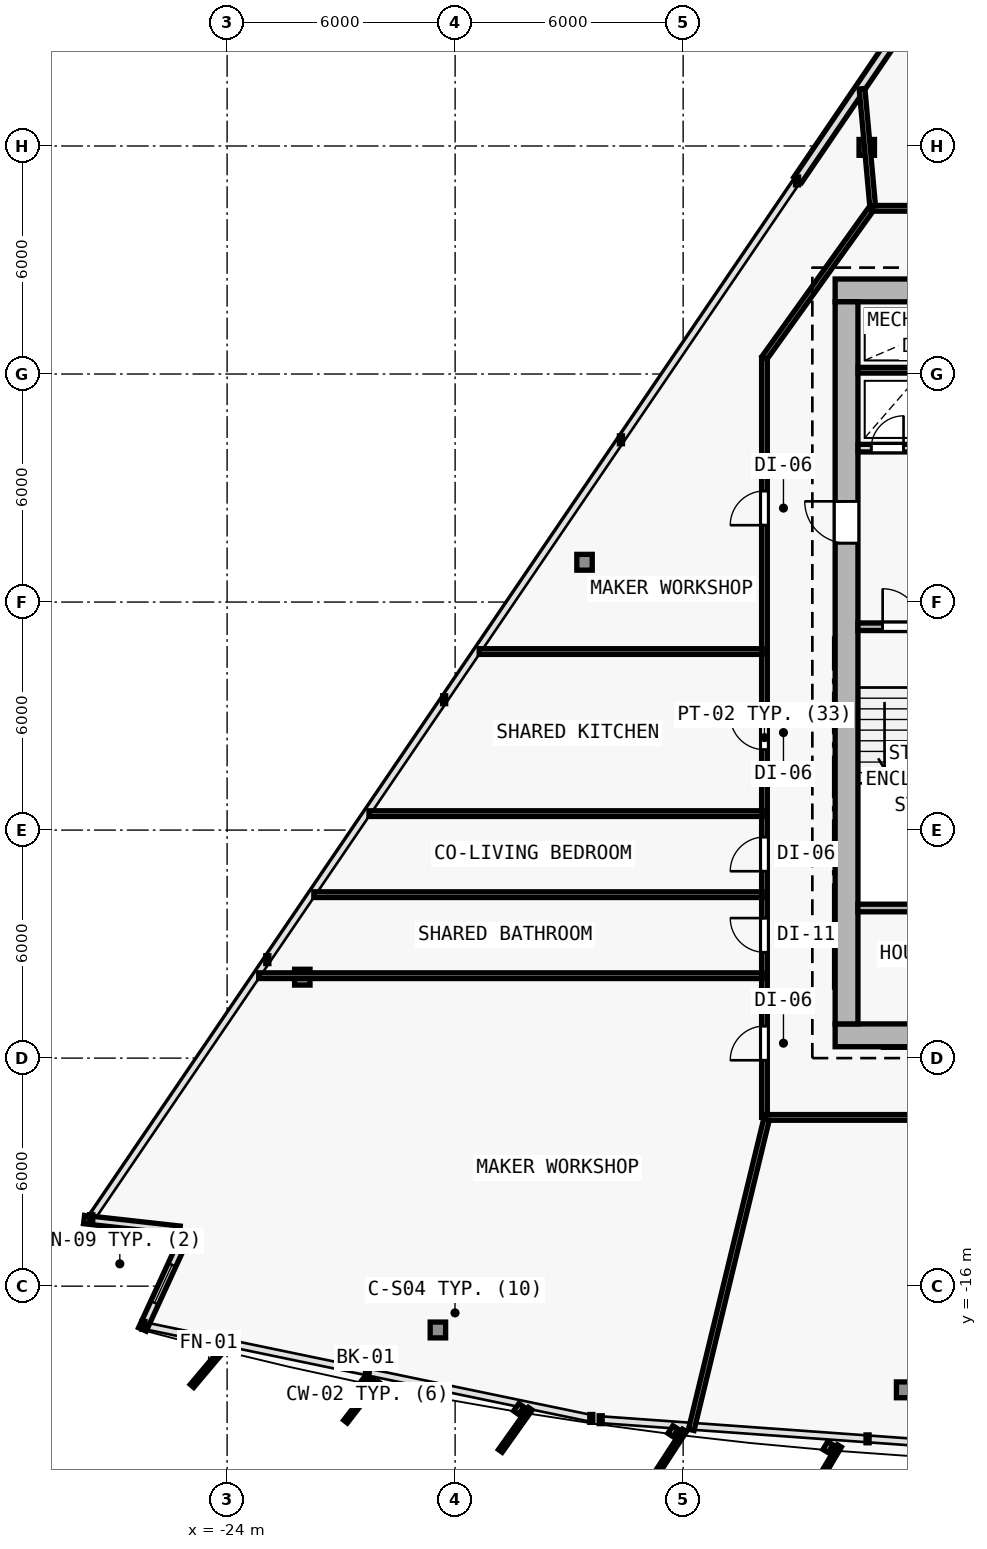
"""IFC4 building model, lengths in metres.
Left out: names, types, materials, properties, quantities, classifications, styles, units other than length and angle.
Written with IfcOpenShell. Run it as: python <this file> out.ifc"""

import sys

from ifc_helpers import new_model, si_unit, direction, frame, frame_2d, origin, origin_2d, place, context, subcontext, project, spatial, rectangle, i_section, extrude, element, fill, save


model = new_model("IFC4")
c1 = context("Model", 3, precision=1e-05, world=origin(), true_north=direction((0.0, 1.0)))
c2 = subcontext(c1, "Body", "Model", "MODEL_VIEW")
j1 = project(units=[si_unit("LENGTHUNIT", "METRE"), si_unit("PLANEANGLEUNIT", "RADIAN")], contexts=[c1])
p1 = place(None, origin())
s1 = spatial("IfcSite", under=j1, at=p1, CompositionType="ELEMENT")
p2 = place(p1, origin())
s2 = spatial("IfcBuilding", under=s1, at=p2, CompositionType="ELEMENT")
p3 = place(p2, frame((0.0, 0.0, 122.1)))
s3 = spatial("IfcBuildingStorey", under=s2, at=p3, CompositionType="ELEMENT", Elevation=122.1)
for number, where, z_axis, x_axis in (
    (1, (-7.7, -9.4, 0.0), (0.0, 0.0, 1.0), (1.0, 0.0, 0.0)),
    (2, (-7.7, 10.2, 0.0), (0.0, 0.0, 1.0), (1.0, 0.0, 0.0)),
    (3, (-7.7, 2.0, 0.0), (0.0, 0.0, 1.0), (1.0, 0.0, 0.0)),
):
    element("IfcColumn", number, at=place(p3, frame(where, z_axis=z_axis, x_axis=x_axis)), inside=s3, PredefinedType="COLUMN", context=c2, shape_type="SweptSolid", body=[
        extrude(i_section(OverallWidth=0.409, OverallDepth=0.425, WebThickness=0.021, FlangeThickness=0.034, FilletRadius=0.015, at=origin_2d()), origin(), (0.0, 0.0, 1.0), 3.6),
    ])
p4 = place(p3, frame((-18.453, -17.153, 0.005), z_axis=(0.020594893987, 0.033509183946, 0.999226193078), x_axis=(-0.851954850327, 0.523615252838, 0.0)))
e4 = element("IfcColumn", 4, at=p4, inside=s3, PredefinedType="COLUMN", context=c2, shape_type="SweptSolid", body=[
    extrude(i_section(OverallWidth=0.406, OverallDepth=0.416, WebThickness=0.019, FlangeThickness=0.031, FilletRadius=0.015, at=origin_2d()), origin(), (0.0, 0.0, 1.0), 3.592),
])
p5 = place(p3, frame((-6.185, -18.729, 0.005), z_axis=(0.006865841702, 0.035280909339, 0.999353850072), x_axis=(-0.981585848295, 0.191021523464, 0.0)))
e5 = element("IfcColumn", 5, at=p5, inside=s3, PredefinedType="COLUMN", context=c2, shape_type="SweptSolid", body=[
    extrude(i_section(OverallWidth=0.406, OverallDepth=0.416, WebThickness=0.019, FlangeThickness=0.031, FilletRadius=0.015, at=origin_2d()), origin(), (0.0, 0.0, 1.0), 3.592),
])
p6 = place(p3, frame((-7.168, 13.963, 0.005), z_axis=(0.008774547672, -0.002516730728, 0.999958335822), x_axis=(0.275705143097, 0.961242255662, 0.0)))
e6 = element("IfcColumn", 6, at=p6, inside=s3, PredefinedType="COLUMN", context=c2, shape_type="SweptSolid", body=[
    extrude(i_section(OverallWidth=0.406, OverallDepth=0.416, WebThickness=0.019, FlangeThickness=0.031, FilletRadius=0.015, at=origin_2d()), origin(), (0.0, 0.0, 1.0), 3.589),
])
p7 = place(p3, frame((-14.595, 3.047, 0.005), z_axis=(0.017070406608, 0.009521342331, 0.99980895438), x_axis=(-0.487119351792, 0.873335409284, 0.0)))
e7 = element("IfcColumn", 7, at=p7, inside=s3, PredefinedType="COLUMN", context=c2, shape_type="SweptSolid", body=[
    extrude(i_section(OverallWidth=0.406, OverallDepth=0.416, WebThickness=0.019, FlangeThickness=0.031, FilletRadius=0.015, at=origin_2d()), origin(), (0.0, 0.0, 1.0), 3.59),
])
p8 = place(p3, frame((-22.021, -7.87, 0.005), z_axis=(0.025222449659, 0.021619242565, 0.999448065876), x_axis=(-0.650791373456, 0.759256602365, 0.0)))
e8 = element("IfcColumn", 8, at=p8, inside=s3, PredefinedType="COLUMN", context=c2, shape_type="SweptSolid", body=[
    extrude(i_section(OverallWidth=0.406, OverallDepth=0.416, WebThickness=0.019, FlangeThickness=0.031, FilletRadius=0.015, at=origin_2d()), origin(), (0.0, 0.0, 1.0), 3.591),
])
p9 = place(p3, frame((-8.984, 13.108, 0.0), z_axis=(0.0, 0.0, 1.0), x_axis=(0.562459365703, 0.826824928225, 0.0)))
e9 = element("IfcWall", 9, at=p9, inside=s3, PredefinedType="SOLIDWALL", context=c2, shape_type="SweptSolid", body=[
    extrude(rectangle(XDim=11.625, YDim=0.25, at=frame_2d((5.812, 0.0))), origin(), (0.0, 0.0, 1.0), 3.35),
])
p10 = place(p9, frame((5.113, 0.0, 0.62)))
e10 = element("IfcOpeningElement", 10, at=p10, cuts=e9, PredefinedType="OPENING", context=c2, shape_type="SweptSolid", body=[
    extrude(rectangle(XDim=1.4, YDim=2.0, at=frame_2d((0.7, 1.0))), frame((0.0, 0.135, 0.0), z_axis=(0.0, -1.0, 0.0), x_axis=(1.0, 0.0, 0.0)), (0.0, 0.0, 1.0), 0.27),
])
p11 = place(p3, frame((-25.246, -14.529, 0.0), z_axis=(0.0, 0.0, 1.0), x_axis=(-0.993831926713, 0.110896805395, 0.0)))
e11 = element("IfcWall", 11, at=p11, inside=s3, PredefinedType="SOLIDWALL", context=c2, shape_type="SweptSolid", body=[
    extrude(rectangle(XDim=2.534, YDim=0.22, at=frame_2d((1.267, 0.0))), origin(), (0.0, 0.0, 1.0), 3.35),
])
p12 = place(p3, frame((-26.229, -17.139, 0.0), z_axis=(0.0, 0.0, 1.0), x_axis=(0.417498108462, 0.908677791866, 0.0)))
e12 = element("IfcWall", 12, at=p12, inside=s3, PredefinedType="SOLIDWALL", context=c2, shape_type="SweptSolid", body=[
    extrude(rectangle(XDim=2.641, YDim=0.22, at=frame_2d((1.32, 0.0))), origin(), (0.0, 0.0, 1.0), 3.35),
])
p13 = place(p12, frame((0.771, 0.0, 0.62)))
e13 = element("IfcOpeningElement", 13, at=p13, cuts=e12, PredefinedType="OPENING", context=c2, shape_type="SweptSolid", body=[
    extrude(rectangle(XDim=1.1, YDim=1.8, at=frame_2d((0.55, 0.9))), frame((0.0, 0.12, 0.0), z_axis=(0.0, -1.0, 0.0), x_axis=(1.0, 0.0, 0.0)), (0.0, 0.0, 1.0), 0.24),
])
p14 = place(p3, frame((-8.0, -9.4, 0.0), z_axis=(0.0, 0.0, 1.0), x_axis=(1.0, 0.0, 0.0)))
e14 = element("IfcWall", 14, at=p14, inside=s3, PredefinedType="SHEAR", context=c2, shape_type="SweptSolid", body=[
    extrude(rectangle(XDim=16.0, YDim=0.6, at=frame_2d((8.0, 0.0))), origin(), (0.0, 0.0, 1.0), 3.35),
])
p15 = place(p14, frame((9.65, 0.0, 0.0)))
e15 = element("IfcOpeningElement", 15, at=p15, cuts=e14, PredefinedType="OPENING", context=c2, shape_type="SweptSolid", body=[
    extrude(rectangle(XDim=1.5, YDim=2.2, at=frame_2d((0.75, 1.1))), frame((0.0, 0.31, 0.0), z_axis=(0.0, -1.0, 0.0), x_axis=(1.0, 0.0, 0.0)), (0.0, 0.0, 1.0), 0.62),
])
p16 = place(p3, frame((8.0, 10.2, 0.0), z_axis=(0.0, 0.0, 1.0), x_axis=(-1.0, 0.0, 0.0)))
e16 = element("IfcWall", 16, at=p16, inside=s3, PredefinedType="SHEAR", context=c2, shape_type="SweptSolid", body=[
    extrude(rectangle(XDim=16.0, YDim=0.6, at=frame_2d((8.0, 0.0))), origin(), (0.0, 0.0, 1.0), 3.35),
])
p17 = place(p16, frame((4.45, 0.0, 0.0)))
e17 = element("IfcOpeningElement", 17, at=p17, cuts=e16, PredefinedType="OPENING", context=c2, shape_type="SweptSolid", body=[
    extrude(rectangle(XDim=1.1, YDim=2.15, at=frame_2d((0.55, 1.075))), frame((0.0, 0.31, 0.0), z_axis=(0.0, -1.0, 0.0), x_axis=(1.0, 0.0, 0.0)), (0.0, 0.0, 1.0), 0.62),
])
p18 = place(p3, frame((-7.7, -9.1, 0.0), z_axis=(0.0, 0.0, 1.0), x_axis=(0.0, 1.0, 0.0)))
e18 = element("IfcWall", 18, at=p18, inside=s3, PredefinedType="SHEAR", context=c2, shape_type="SweptSolid", body=[
    extrude(rectangle(XDim=19.0, YDim=0.6, at=frame_2d((9.5, 0.0))), origin(), (0.0, 0.0, 1.0), 3.35),
])
p19 = place(p18, frame((12.65, 0.0, 0.0)))
e19 = element("IfcOpeningElement", 19, at=p19, cuts=e18, PredefinedType="OPENING", context=c2, shape_type="SweptSolid", body=[
    extrude(rectangle(XDim=1.1, YDim=2.15, at=frame_2d((0.55, 1.075))), frame((0.0, 0.31, 0.0), z_axis=(0.0, -1.0, 0.0), x_axis=(1.0, 0.0, 0.0)), (0.0, 0.0, 1.0), 0.62),
])
p20 = place(p3, frame((-7.4, 1.35, 0.0), z_axis=(0.0, 0.0, 1.0), x_axis=(1.0, 0.0, 0.0)))
e20 = element("IfcWall", 20, at=p20, inside=s3, PredefinedType="SOLIDWALL", context=c2, shape_type="SweptSolid", body=[
    extrude(rectangle(XDim=3.35, YDim=0.2, at=frame_2d((1.675, 0.0))), origin(), (0.0, 0.0, 1.0), 3.35),
])
p21 = place(p20, frame((0.65, 0.0, 0.0)))
e21 = element("IfcOpeningElement", 21, at=p21, cuts=e20, PredefinedType="OPENING", context=c2, shape_type="SweptSolid", body=[
    extrude(rectangle(XDim=1.0, YDim=2.15, at=frame_2d((0.5, 1.075))), frame((0.0, 0.11, 0.0), z_axis=(0.0, -1.0, 0.0), x_axis=(1.0, 0.0, 0.0)), (0.0, 0.0, 1.0), 0.22),
])
p22 = place(p3, frame((-7.395, 6.05, 0.0), z_axis=(0.0, 0.0, 1.0), x_axis=(1.0, 0.0, 0.0)))
e22 = element("IfcWall", 22, at=p22, inside=s3, PredefinedType="SOLIDWALL", context=c2, shape_type="SweptSolid", body=[
    extrude(rectangle(XDim=3.545, YDim=0.2, at=frame_2d((1.772, 0.0))), origin(), (0.0, 0.0, 1.0), 3.35),
])
p23 = place(p22, frame((0.345, 0.0, 0.0)))
e23 = element("IfcOpeningElement", 23, at=p23, cuts=e22, PredefinedType="OPENING", context=c2, shape_type="SweptSolid", body=[
    extrude(rectangle(XDim=0.85, YDim=2.1, at=frame_2d((0.425, 1.05))), frame((0.0, 0.11, 0.0), z_axis=(0.0, -1.0, 0.0), x_axis=(1.0, 0.0, 0.0)), (0.0, 0.0, 1.0), 0.22),
])
p24 = place(p22, frame((2.145, 0.0, 0.0)))
e24 = element("IfcOpeningElement", 24, at=p24, cuts=e22, PredefinedType="OPENING", context=c2, shape_type="SweptSolid", body=[
    extrude(rectangle(XDim=0.85, YDim=2.1, at=frame_2d((0.425, 1.05))), frame((0.0, 0.11, 0.0), z_axis=(0.0, -1.0, 0.0), x_axis=(1.0, 0.0, 0.0)), (0.0, 0.0, 1.0), 0.22),
])
p25 = place(p3, frame((-7.395, 8.1, 0.0), z_axis=(0.0, 0.0, 1.0), x_axis=(1.0, 0.0, 0.0)))
e25 = element("IfcWall", 25, at=p25, inside=s3, PredefinedType="PARTITIONING", context=c2, shape_type="SweptSolid", body=[
    extrude(rectangle(XDim=3.545, YDim=0.15, at=frame_2d((1.772, 0.0))), origin(), (0.0, 0.0, 1.0), 3.35),
])
p26 = place(p3, frame((-7.4, -6.05, 0.0), z_axis=(0.0, 0.0, 1.0), x_axis=(1.0, 0.0, 0.0)))
e26 = element("IfcWall", 26, at=p26, inside=s3, PredefinedType="SOLIDWALL", context=c2, shape_type="SweptSolid", body=[
    extrude(rectangle(XDim=3.35, YDim=0.2, at=frame_2d((1.675, 0.0))), origin(), (0.0, 0.0, 1.0), 3.35),
])
p27 = place(p3, frame((-9.86, -11.56, 0.0), z_axis=(0.0, 0.0, 1.0), x_axis=(0.0, 1.0, 0.0)))
e27 = element("IfcWall", 27, at=p27, inside=s3, PredefinedType="PARTITIONING", context=c2, shape_type="SweptSolid", body=[
    extrude(rectangle(XDim=19.986, YDim=0.15, at=frame_2d((9.993, 0.0))), origin(), (0.0, 0.0, 1.0), 2.705),
])
p28 = place(p27, frame((9.675, 0.0, 0.0)))
e28 = element("IfcOpeningElement", 28, at=p28, cuts=e27, PredefinedType="OPENING", context=c2, shape_type="SweptSolid", body=[
    extrude(rectangle(XDim=0.9, YDim=2.1, at=frame_2d((0.45, 1.05))), frame((0.0, 0.085, 0.0), z_axis=(0.0, -1.0, 0.0), x_axis=(1.0, 0.0, 0.0)), (0.0, 0.0, 1.0), 0.17),
])
p29 = place(p27, frame((6.477, 0.0, 0.0)))
e29 = element("IfcOpeningElement", 29, at=p29, cuts=e27, PredefinedType="OPENING", context=c2, shape_type="SweptSolid", body=[
    extrude(rectangle(XDim=0.9, YDim=2.1, at=frame_2d((0.45, 1.05))), frame((0.0, 0.085, 0.0), z_axis=(0.0, -1.0, 0.0), x_axis=(1.0, 0.0, 0.0)), (0.0, 0.0, 1.0), 0.17),
])
p30 = place(p27, frame((4.345, 0.0, 0.0)))
e30 = element("IfcOpeningElement", 30, at=p30, cuts=e27, PredefinedType="OPENING", context=c2, shape_type="SweptSolid", body=[
    extrude(rectangle(XDim=0.9, YDim=2.1, at=frame_2d((0.45, 1.05))), frame((0.0, 0.085, 0.0), z_axis=(0.0, -1.0, 0.0), x_axis=(1.0, 0.0, 0.0)), (0.0, 0.0, 1.0), 0.17),
])
p31 = place(p27, frame((1.504, 0.0, 0.0)))
e31 = element("IfcOpeningElement", 31, at=p31, cuts=e27, PredefinedType="OPENING", context=c2, shape_type="SweptSolid", body=[
    extrude(rectangle(XDim=0.9, YDim=2.1, at=frame_2d((0.45, 1.05))), frame((0.0, 0.085, 0.0), z_axis=(0.0, -1.0, 0.0), x_axis=(1.0, 0.0, 0.0)), (0.0, 0.0, 1.0), 0.17),
])
p32 = place(p27, frame((15.583, 0.0, 0.0)))
e32 = element("IfcOpeningElement", 32, at=p32, cuts=e27, PredefinedType="OPENING", context=c2, shape_type="SweptSolid", body=[
    extrude(rectangle(XDim=0.9, YDim=2.1, at=frame_2d((0.45, 1.05))), frame((0.0, 0.085, 0.0), z_axis=(0.0, -1.0, 0.0), x_axis=(1.0, 0.0, 0.0)), (0.0, 0.0, 1.0), 0.17),
])
p33 = place(p3, frame((-9.86, 8.426, 0.0), z_axis=(0.0, 0.0, 1.0), x_axis=(0.582449511476, 0.812866881218, 0.0)))
e33 = element("IfcWall", 33, at=p33, inside=s3, PredefinedType="PARTITIONING", context=c2, shape_type="SweptSolid", body=[
    extrude(rectangle(XDim=4.84, YDim=0.15, at=frame_2d((2.42, 0.0))), origin(), (0.0, 0.0, 1.0), 2.965),
])
p34 = place(p3, frame((-7.041, 12.36, 0.0), z_axis=(0.0, 0.0, 1.0), x_axis=(1.0, 0.0, 0.0)))
e34 = element("IfcWall", 34, at=p34, inside=s3, PredefinedType="PARTITIONING", context=c2, shape_type="SweptSolid", body=[
    extrude(rectangle(XDim=14.064, YDim=0.15, at=frame_2d((7.032, 0.0))), origin(), (0.0, 0.0, 1.0), 3.35),
])
p35 = place(p34, frame((12.017, 0.0, 0.0)))
e35 = element("IfcOpeningElement", 35, at=p35, cuts=e34, PredefinedType="OPENING", context=c2, shape_type="SweptSolid", body=[
    extrude(rectangle(XDim=0.9, YDim=2.1, at=frame_2d((0.45, 1.05))), frame((0.0, 0.085, 0.0), z_axis=(0.0, -1.0, 0.0), x_axis=(1.0, 0.0, 0.0)), (0.0, 0.0, 1.0), 0.17),
])
p36 = place(p34, frame((9.77, 0.0, 0.0)))
e36 = element("IfcOpeningElement", 36, at=p36, cuts=e34, PredefinedType="OPENING", context=c2, shape_type="SweptSolid", body=[
    extrude(rectangle(XDim=0.85, YDim=2.1, at=frame_2d((0.425, 1.05))), frame((0.0, 0.085, 0.0), z_axis=(0.0, -1.0, 0.0), x_axis=(1.0, 0.0, 0.0)), (0.0, 0.0, 1.0), 0.17),
])
p37 = place(p34, frame((8.112, 0.0, 0.0)))
e37 = element("IfcOpeningElement", 37, at=p37, cuts=e34, PredefinedType="OPENING", context=c2, shape_type="SweptSolid", body=[
    extrude(rectangle(XDim=0.85, YDim=2.1, at=frame_2d((0.425, 1.05))), frame((0.0, 0.085, 0.0), z_axis=(0.0, -1.0, 0.0), x_axis=(1.0, 0.0, 0.0)), (0.0, 0.0, 1.0), 0.17),
])
p38 = place(p34, frame((3.506, 0.0, 0.0)))
e38 = element("IfcOpeningElement", 38, at=p38, cuts=e34, PredefinedType="OPENING", context=c2, shape_type="SweptSolid", body=[
    extrude(rectangle(XDim=0.9, YDim=2.1, at=frame_2d((0.45, 1.05))), frame((0.0, 0.085, 0.0), z_axis=(0.0, -1.0, 0.0), x_axis=(1.0, 0.0, 0.0)), (0.0, 0.0, 1.0), 0.17),
])
p39 = place(p3, frame((13.18, -11.56, 0.0), z_axis=(0.0, 0.0, 1.0), x_axis=(-1.0, 0.0, 0.0)))
e39 = element("IfcWall", 39, at=p39, inside=s3, PredefinedType="PARTITIONING", context=c2, shape_type="SweptSolid", body=[
    extrude(rectangle(XDim=23.04, YDim=0.15, at=frame_2d((11.52, 0.0))), origin(), (0.0, 0.0, 1.0), 2.775),
])
p40 = place(p39, frame((14.485, 0.0, 0.0)))
e40 = element("IfcOpeningElement", 40, at=p40, cuts=e39, PredefinedType="OPENING", context=c2, shape_type="SweptSolid", body=[
    extrude(rectangle(XDim=0.9, YDim=2.1, at=frame_2d((0.45, 1.05))), frame((0.0, 0.085, 0.0), z_axis=(0.0, -1.0, 0.0), x_axis=(1.0, 0.0, 0.0)), (0.0, 0.0, 1.0), 0.17),
])
p41 = place(p39, frame((3.143, 0.0, 0.0)))
e41 = element("IfcOpeningElement", 41, at=p41, cuts=e39, PredefinedType="OPENING", context=c2, shape_type="SweptSolid", body=[
    extrude(rectangle(XDim=0.9, YDim=2.1, at=frame_2d((0.45, 1.05))), frame((0.0, 0.085, 0.0), z_axis=(0.0, -1.0, 0.0), x_axis=(1.0, 0.0, 0.0)), (0.0, 0.0, 1.0), 0.17),
])
p42 = place(p3, frame((-7.013, 12.419, 0.0), z_axis=(0.0, 0.0, 1.0), x_axis=(-0.090031491969, 0.995938919038, 0.0)))
e42 = element("IfcWall", 42, at=p42, inside=s3, PredefinedType="PARTITIONING", context=c2, shape_type="SweptSolid", body=[
    extrude(rectangle(XDim=3.1, YDim=0.15, at=frame_2d((1.55, 0.0))), origin(), (0.0, 0.0, 1.0), 2.885),
])
p43 = place(p3, frame((-9.92, -7.831, 0.0), z_axis=(0.0, 0.0, 1.0), x_axis=(-1.0, 0.0, 0.0)))
e43 = element("IfcWall", 43, at=p43, inside=s3, PredefinedType="PARTITIONING", context=c2, shape_type="SweptSolid", body=[
    extrude(rectangle(XDim=13.248, YDim=0.15, at=frame_2d((6.624, 0.0))), origin(), (0.0, 0.0, 1.0), 2.705),
])
p44 = place(p3, frame((-9.92, 0.698, 0.0), z_axis=(0.0, 0.0, 1.0), x_axis=(-1.0, 0.0, 0.0)))
e44 = element("IfcWall", 44, at=p44, inside=s3, PredefinedType="PARTITIONING", context=c2, shape_type="SweptSolid", body=[
    extrude(rectangle(XDim=7.446, YDim=0.15, at=frame_2d((3.723, 0.0))), origin(), (0.0, 0.0, 1.0), 2.885),
])
p45 = place(p3, frame((-9.807, -11.617, 0.0), z_axis=(0.0, 0.0, 1.0), x_axis=(-0.235554275972, -0.971861195373, 0.0)))
e45 = element("IfcWall", 45, at=p45, inside=s3, PredefinedType="PARTITIONING", context=c2, shape_type="SweptSolid", body=[
    extrude(rectangle(XDim=8.4, YDim=0.15, at=frame_2d((4.2, 0.0))), origin(), (0.0, 0.0, 1.0), 2.885),
])
p46 = place(p3, frame((-9.92, -3.567, 0.0), z_axis=(0.0, 0.0, 1.0), x_axis=(-0.999999999722, 2.3594922e-05, 0.0)))
e46 = element("IfcWall", 46, at=p46, inside=s3, PredefinedType="PARTITIONING", context=c2, shape_type="SweptSolid", body=[
    extrude(rectangle(XDim=10.347, YDim=0.15, at=frame_2d((5.174, 0.0))), origin(), (0.0, 0.0, 1.0), 2.885),
])
p47 = place(p3, frame((-9.92, -5.699, 0.0), z_axis=(0.0, 0.0, 1.0), x_axis=(-1.0, 0.0, 0.0)))
e47 = element("IfcWall", 47, at=p47, inside=s3, PredefinedType="PARTITIONING", context=c2, shape_type="SweptSolid", body=[
    extrude(rectangle(XDim=11.798, YDim=0.15, at=frame_2d((5.899, 0.0))), origin(), (0.0, 0.0, 1.0), 2.885),
])
p48 = place(p13, origin())
e48 = element("IfcWindow", 48, at=p48, inside=s3, PartitioningType="SINGLE_PANEL", PredefinedType="WINDOW", context=c2, shape_type="SweptSolid", body=[
    extrude(rectangle(XDim=1.1, YDim=1.8, at=frame_2d((0.55, 0.9))), frame((0.0, 0.03, 0.0), z_axis=(0.0, -1.0, 0.0), x_axis=(1.0, 0.0, 0.0)), (0.0, 0.0, 1.0), 0.06),
])
fill(e13, e48)
p49 = place(p19, origin())
e49 = element("IfcDoor", 49, at=p49, inside=s3, OperationType="SINGLE_SWING_RIGHT", PredefinedType="DOOR", context=c2, shape_type="SweptSolid", body=[
    extrude(rectangle(XDim=1.1, YDim=2.15, at=frame_2d((0.55, 1.075))), frame((0.0, 0.025, 0.0), z_axis=(0.0, -1.0, 0.0), x_axis=(1.0, 0.0, 0.0)), (0.0, 0.0, 1.0), 0.05),
])
fill(e19, e49)
p50 = place(p21, origin())
e50 = element("IfcDoor", 50, at=p50, inside=s3, OperationType="SINGLE_SWING_LEFT", PredefinedType="DOOR", context=c2, shape_type="SweptSolid", body=[
    extrude(rectangle(XDim=1.0, YDim=2.15, at=frame_2d((0.5, 1.075))), frame((0.0, 0.025, 0.0), z_axis=(0.0, -1.0, 0.0), x_axis=(1.0, 0.0, 0.0)), (0.0, 0.0, 1.0), 0.05),
])
fill(e21, e50)
p51 = place(p23, origin())
e51 = element("IfcDoor", 51, at=p51, inside=s3, OperationType="SINGLE_SWING_RIGHT", PredefinedType="DOOR", context=c2, shape_type="SweptSolid", body=[
    extrude(rectangle(XDim=0.85, YDim=2.1, at=frame_2d((0.425, 1.05))), frame((0.0, 0.025, 0.0), z_axis=(0.0, -1.0, 0.0), x_axis=(1.0, 0.0, 0.0)), (0.0, 0.0, 1.0), 0.05),
])
fill(e23, e51)
p52 = place(p28, origin())
e52 = element("IfcDoor", 52, at=p52, inside=s3, OperationType="SINGLE_SWING_RIGHT", PredefinedType="DOOR", context=c2, shape_type="SweptSolid", body=[
    extrude(rectangle(XDim=0.9, YDim=2.1, at=frame_2d((0.45, 1.05))), frame((0.0, 0.025, 0.0), z_axis=(0.0, -1.0, 0.0), x_axis=(1.0, 0.0, 0.0)), (0.0, 0.0, 1.0), 0.05),
])
fill(e28, e52)
p53 = place(p29, origin())
e53 = element("IfcDoor", 53, at=p53, inside=s3, OperationType="SINGLE_SWING_LEFT", PredefinedType="DOOR", context=c2, shape_type="SweptSolid", body=[
    extrude(rectangle(XDim=0.9, YDim=2.1, at=frame_2d((0.45, 1.05))), frame((0.0, 0.025, 0.0), z_axis=(0.0, -1.0, 0.0), x_axis=(1.0, 0.0, 0.0)), (0.0, 0.0, 1.0), 0.05),
])
fill(e29, e53)
p54 = place(p30, origin())
e54 = element("IfcDoor", 54, at=p54, inside=s3, OperationType="SINGLE_SWING_RIGHT", PredefinedType="DOOR", context=c2, shape_type="SweptSolid", body=[
    extrude(rectangle(XDim=0.9, YDim=2.1, at=frame_2d((0.45, 1.05))), frame((0.0, 0.025, 0.0), z_axis=(0.0, -1.0, 0.0), x_axis=(1.0, 0.0, 0.0)), (0.0, 0.0, 1.0), 0.05),
])
fill(e30, e54)
p55 = place(p31, origin())
e55 = element("IfcDoor", 55, at=p55, inside=s3, OperationType="SINGLE_SWING_LEFT", PredefinedType="DOOR", context=c2, shape_type="SweptSolid", body=[
    extrude(rectangle(XDim=0.9, YDim=2.1, at=frame_2d((0.45, 1.05))), frame((0.0, 0.025, 0.0), z_axis=(0.0, -1.0, 0.0), x_axis=(1.0, 0.0, 0.0)), (0.0, 0.0, 1.0), 0.05),
])
fill(e31, e55)
p56 = place(p32, origin())
e56 = element("IfcDoor", 56, at=p56, inside=s3, OperationType="SINGLE_SWING_LEFT", PredefinedType="DOOR", context=c2, shape_type="SweptSolid", body=[
    extrude(rectangle(XDim=0.9, YDim=2.1, at=frame_2d((0.45, 1.05))), frame((0.0, 0.025, 0.0), z_axis=(0.0, -1.0, 0.0), x_axis=(1.0, 0.0, 0.0)), (0.0, 0.0, 1.0), 0.05),
])
fill(e32, e56)
save(model, sys.argv[1])
